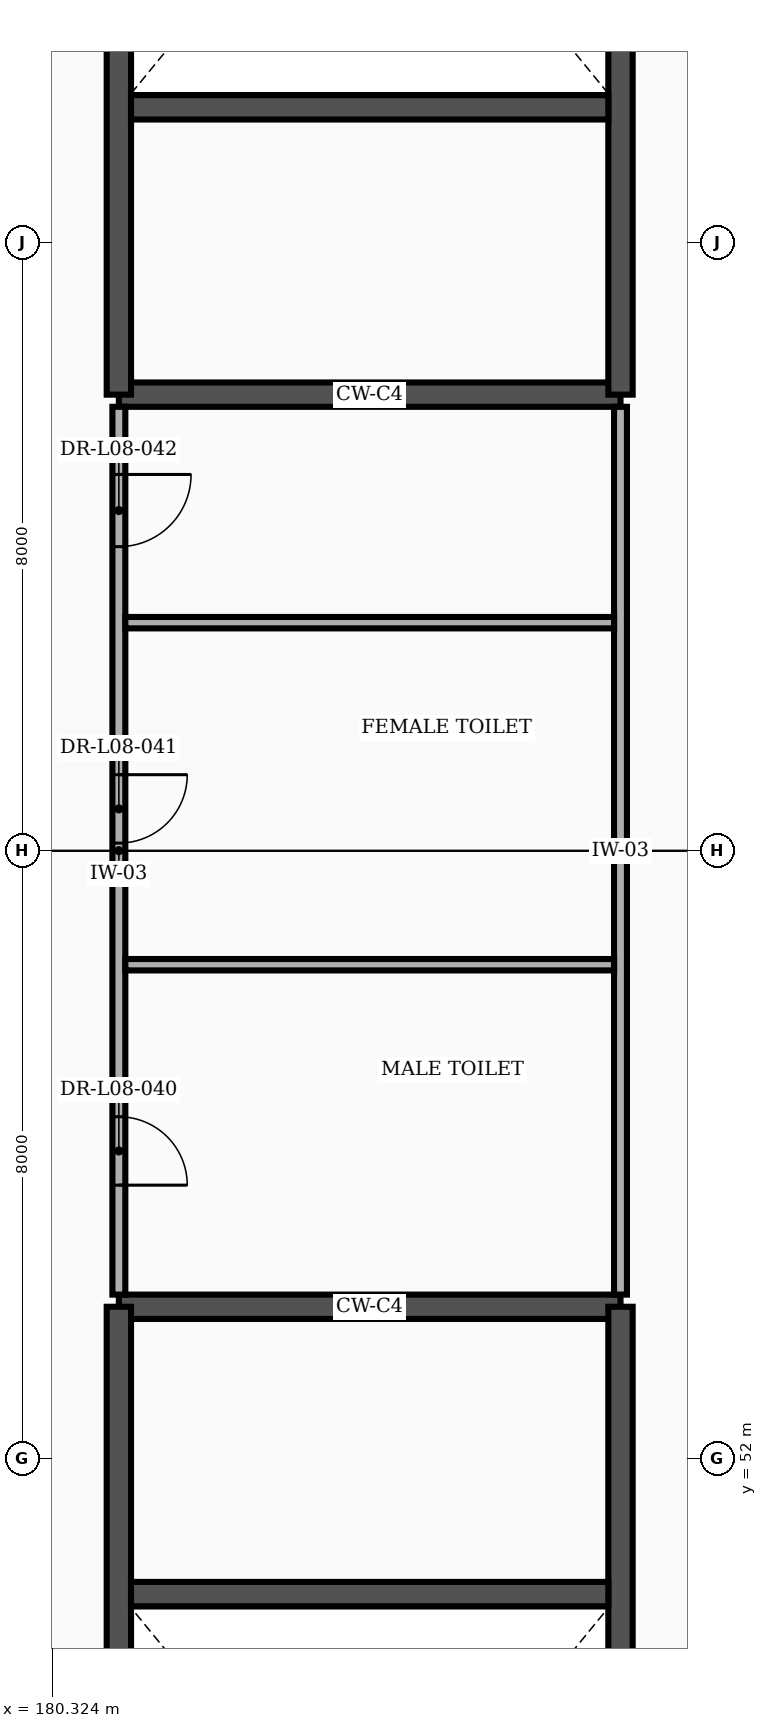
"""IFC4 building model, lengths in metres.
Left out: names, types, materials, properties, quantities, classifications, styles, units other than length and angle.
Written with IfcOpenShell. Run it as: python <this file> out.ifc"""

import sys

from ifc_helpers import new_model, si_unit, direction, frame, frame_2d, origin, place, context, subcontext, project, spatial, rectangle, extrude, element, fill, save


model = new_model("IFC4")
c1 = context("Model", 3, precision=1e-05, world=origin(), true_north=direction((0.0, 1.0)))
c2 = subcontext(c1, "Body", "Model", "MODEL_VIEW")
j1 = project(units=[si_unit("LENGTHUNIT", "METRE"), si_unit("PLANEANGLEUNIT", "RADIAN")], contexts=[c1])
p1 = place(None, origin())
s1 = spatial("IfcSite", under=j1, at=p1, CompositionType="ELEMENT")
p2 = place(p1, origin())
s2 = spatial("IfcBuilding", under=s1, at=p2, CompositionType="ELEMENT")
p3 = place(p2, frame((0.0, 0.0, 37.8)))
s3 = spatial("IfcBuildingStorey", under=s2, at=p3, CompositionType="ELEMENT", Elevation=37.8)
p4 = place(p3, frame((181.2, 54.0, 0.0), z_axis=(0.0, 0.0, 1.0), x_axis=(1.0, 0.0, 0.0)))
e1 = element("IfcWall", 1, at=p4, inside=s3, PredefinedType="SHEAR", context=c2, shape_type="SweptSolid", body=[
    extrude(rectangle(XDim=6.6, YDim=0.32, at=frame_2d((3.3, 0.0))), origin(), (0.0, 0.0, 1.0), 3.565),
])
p5 = place(p3, frame((181.2, 39.4, 0.0), z_axis=(0.0, 0.0, 1.0), x_axis=(0.0, 1.0, 0.0)))
e2 = element("IfcWall", 2, at=p5, inside=s3, PredefinedType="SHEAR", context=c2, shape_type="SweptSolid", body=[
    extrude(rectangle(XDim=14.6, YDim=0.32, at=frame_2d((7.3, 0.0))), origin(), (0.0, 0.0, 1.0), 3.565),
])
p6 = place(p5, frame((0.55, 0.0, 0.0)))
e3 = element("IfcOpeningElement", 3, at=p6, cuts=e2, PredefinedType="OPENING", context=c2, shape_type="SweptSolid", body=[
    extrude(rectangle(XDim=2.4, YDim=2.25, at=frame_2d((1.2, 1.125))), frame((0.0, 0.172, 0.0), z_axis=(0.0, -1.0, 0.0), x_axis=(1.0, 0.0, 0.0)), (0.0, 0.0, 1.0), 0.344),
])
p7 = place(p3, frame((187.8, 39.4, 0.0), z_axis=(0.0, 0.0, 1.0), x_axis=(0.0, 1.0, 0.0)))
e4 = element("IfcWall", 4, at=p7, inside=s3, PredefinedType="SHEAR", context=c2, shape_type="SweptSolid", body=[
    extrude(rectangle(XDim=14.6, YDim=0.32, at=frame_2d((7.3, 0.0))), origin(), (0.0, 0.0, 1.0), 3.565),
])
p8 = place(p3, frame((181.36, 50.22, 0.0), z_axis=(0.0, 0.0, 1.0), x_axis=(1.0, 0.0, 0.0)))
e5 = element("IfcWall", 5, at=p8, inside=s3, PredefinedType="SHEAR", context=c2, shape_type="SweptSolid", body=[
    extrude(rectangle(XDim=6.28, YDim=0.32, at=frame_2d((3.14, 0.0))), origin(), (0.0, 0.0, 1.0), 3.565),
])
p9 = place(p3, frame((181.2, 66.0, 0.0), z_axis=(0.0, 0.0, 1.0), x_axis=(1.0, 0.0, 0.0)))
e6 = element("IfcWall", 6, at=p9, inside=s3, PredefinedType="SHEAR", context=c2, shape_type="SweptSolid", body=[
    extrude(rectangle(XDim=6.6, YDim=0.32, at=frame_2d((3.3, 0.0))), origin(), (0.0, 0.0, 1.0), 3.565),
])
p10 = place(p3, frame((181.2, 66.0, 0.0), z_axis=(0.0, 0.0, 1.0), x_axis=(0.0, 1.0, 0.0)))
e7 = element("IfcWall", 7, at=p10, inside=s3, PredefinedType="SHEAR", context=c2, shape_type="SweptSolid", body=[
    extrude(rectangle(XDim=14.6, YDim=0.32, at=frame_2d((7.3, 0.0))), origin(), (0.0, 0.0, 1.0), 3.565),
])
p11 = place(p10, frame((11.65, 0.0, 0.0)))
e8 = element("IfcOpeningElement", 8, at=p11, cuts=e7, PredefinedType="OPENING", context=c2, shape_type="SweptSolid", body=[
    extrude(rectangle(XDim=2.4, YDim=2.25, at=frame_2d((1.2, 1.125))), frame((0.0, 0.172, 0.0), z_axis=(0.0, -1.0, 0.0), x_axis=(1.0, 0.0, 0.0)), (0.0, 0.0, 1.0), 0.344),
])
p12 = place(p3, frame((187.8, 66.0, 0.0), z_axis=(0.0, 0.0, 1.0), x_axis=(0.0, 1.0, 0.0)))
e9 = element("IfcWall", 9, at=p12, inside=s3, PredefinedType="SHEAR", context=c2, shape_type="SweptSolid", body=[
    extrude(rectangle(XDim=14.6, YDim=0.32, at=frame_2d((7.3, 0.0))), origin(), (0.0, 0.0, 1.0), 3.565),
])
p13 = place(p3, frame((181.36, 69.78, 0.0), z_axis=(0.0, 0.0, 1.0), x_axis=(1.0, 0.0, 0.0)))
e10 = element("IfcWall", 10, at=p13, inside=s3, PredefinedType="SHEAR", context=c2, shape_type="SweptSolid", body=[
    extrude(rectangle(XDim=6.28, YDim=0.32, at=frame_2d((3.14, 0.0))), origin(), (0.0, 0.0, 1.0), 3.565),
])
p14 = place(p3, frame((187.8, 54.16, 0.0), z_axis=(0.0, 0.0, 1.0), x_axis=(0.0, 1.0, 0.0)))
e11 = element("IfcWall", 11, at=p14, inside=s3, PredefinedType="PARTITIONING", context=c2, shape_type="SweptSolid", body=[
    extrude(rectangle(XDim=11.68, YDim=0.17, at=frame_2d((5.84, 0.0))), origin(), (0.0, 0.0, 1.0), 3.565),
])
p15 = place(p3, frame((181.2, 54.16, 0.0), z_axis=(0.0, 0.0, 1.0), x_axis=(0.0, 1.0, 0.0)))
e12 = element("IfcWall", 12, at=p15, inside=s3, PredefinedType="PARTITIONING", context=c2, shape_type="SweptSolid", body=[
    extrude(rectangle(XDim=11.68, YDim=0.17, at=frame_2d((5.84, 0.0))), origin(), (0.0, 0.0, 1.0), 3.565),
])
p16 = place(p15, frame((1.44, 0.0, 0.0)))
e13 = element("IfcOpeningElement", 13, at=p16, cuts=e12, PredefinedType="OPENING", context=c2, shape_type="SweptSolid", body=[
    extrude(rectangle(XDim=0.9, YDim=2.1, at=frame_2d((0.45, 1.05))), frame((0.0, 0.097, 0.0), z_axis=(0.0, -1.0, 0.0), x_axis=(1.0, 0.0, 0.0)), (0.0, 0.0, 1.0), 0.194),
])
p17 = place(p15, frame((5.94, 0.0, 0.0)))
e14 = element("IfcOpeningElement", 14, at=p17, cuts=e12, PredefinedType="OPENING", context=c2, shape_type="SweptSolid", body=[
    extrude(rectangle(XDim=0.9, YDim=2.1, at=frame_2d((0.45, 1.05))), frame((0.0, 0.097, 0.0), z_axis=(0.0, -1.0, 0.0), x_axis=(1.0, 0.0, 0.0)), (0.0, 0.0, 1.0), 0.194),
])
p18 = place(p15, frame((9.84, 0.0, 0.0)))
e15 = element("IfcOpeningElement", 15, at=p18, cuts=e12, PredefinedType="OPENING", context=c2, shape_type="SweptSolid", body=[
    extrude(rectangle(XDim=0.95, YDim=2.1, at=frame_2d((0.475, 1.05))), frame((0.0, 0.097, 0.0), z_axis=(0.0, -1.0, 0.0), x_axis=(1.0, 0.0, 0.0)), (0.0, 0.0, 1.0), 0.194),
])
for number, where, z_axis, x_axis in (
    (16, (181.285, 58.5, 0.0), (0.0, 0.0, 1.0), (1.0, 0.0, 0.0)),
    (17, (181.285, 63.0, 0.0), (0.0, 0.0, 1.0), (1.0, 0.0, 0.0)),
):
    element("IfcWall", number, at=place(p3, frame(where, z_axis=z_axis, x_axis=x_axis)), inside=s3, PredefinedType="PARTITIONING", context=c2, shape_type="SweptSolid", body=[
        extrude(rectangle(XDim=6.43, YDim=0.15, at=frame_2d((3.215, 0.0))), origin(), (0.0, 0.0, 1.0), 3.565),
    ])
p19 = place(p16, frame((0.9, 0.0, 0.0), z_axis=(0.0, 0.0, 1.0), x_axis=(-1.0, 0.0, 0.0)))
e18 = element("IfcDoor", 18, at=p19, inside=s3, OperationType="SINGLE_SWING_RIGHT", PredefinedType="DOOR", context=c2, shape_type="SweptSolid", body=[
    extrude(rectangle(XDim=0.9, YDim=2.1, at=frame_2d((0.45, 1.05))), frame((0.0, 0.025, 0.0), z_axis=(0.0, -1.0, 0.0), x_axis=(1.0, 0.0, 0.0)), (0.0, 0.0, 1.0), 0.05),
])
fill(e13, e18)
p20 = place(p17, frame((0.9, 0.0, 0.0), z_axis=(0.0, 0.0, 1.0), x_axis=(-1.0, 0.0, 0.0)))
e19 = element("IfcDoor", 19, at=p20, inside=s3, OperationType="SINGLE_SWING_LEFT", PredefinedType="DOOR", context=c2, shape_type="SweptSolid", body=[
    extrude(rectangle(XDim=0.9, YDim=2.1, at=frame_2d((0.45, 1.05))), frame((0.0, 0.025, 0.0), z_axis=(0.0, -1.0, 0.0), x_axis=(1.0, 0.0, 0.0)), (0.0, 0.0, 1.0), 0.05),
])
fill(e14, e19)
p21 = place(p18, frame((0.95, 0.0, 0.0), z_axis=(0.0, 0.0, 1.0), x_axis=(-1.0, 0.0, 0.0)))
e20 = element("IfcDoor", 20, at=p21, inside=s3, OperationType="SINGLE_SWING_LEFT", PredefinedType="DOOR", context=c2, shape_type="SweptSolid", body=[
    extrude(rectangle(XDim=0.95, YDim=2.1, at=frame_2d((0.475, 1.05))), frame((0.0, 0.025, 0.0), z_axis=(0.0, -1.0, 0.0), x_axis=(1.0, 0.0, 0.0)), (0.0, 0.0, 1.0), 0.05),
])
fill(e15, e20)
save(model, sys.argv[1])
